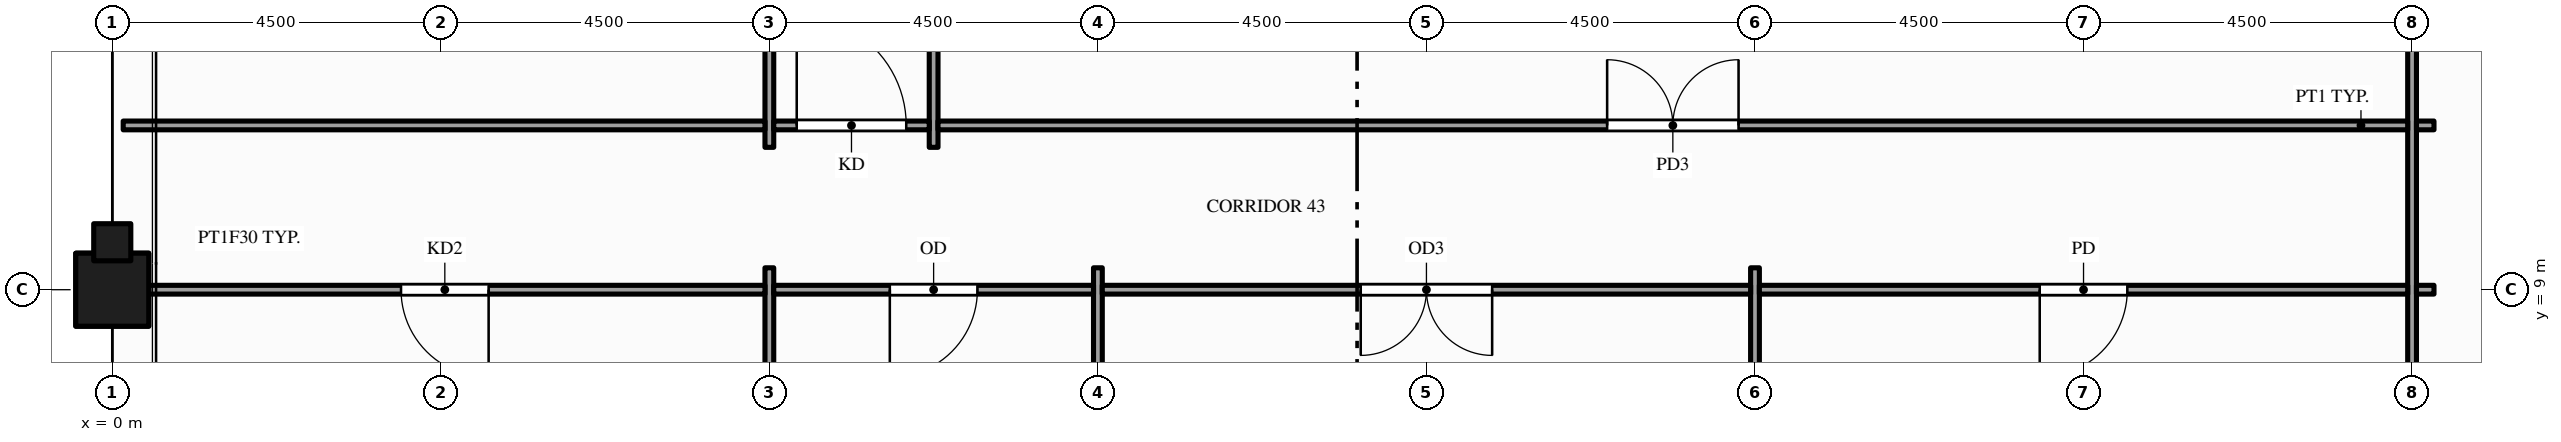
"""IFC4 building model, lengths in metres.
Left out: names, types, materials, properties, quantities, classifications, styles, units other than length and angle.
Written with IfcOpenShell. Run it as: python <this file> out.ifc"""

import sys

from ifc_helpers import new_model, si_unit, direction, frame, frame_2d, origin, origin_2d, place, context, subcontext, project, spatial, rectangle, hollow_rectangle, extrude, element, fill, save


model = new_model("IFC4")
c1 = context("Model", 3, precision=1e-05, world=origin(), true_north=direction((0.0, 1.0)))
c2 = subcontext(c1, "Body", "Model", "MODEL_VIEW")
j1 = project(units=[si_unit("LENGTHUNIT", "METRE"), si_unit("PLANEANGLEUNIT", "RADIAN")], contexts=[c1])
p1 = place(None, origin())
s1 = spatial("IfcSite", under=j1, at=p1, CompositionType="ELEMENT")
p2 = place(p1, origin())
s2 = spatial("IfcBuilding", under=s1, at=p2, CompositionType="ELEMENT")
p3 = place(p2, frame((0.0, 0.0, 131.0)))
s3 = spatial("IfcBuildingStorey", under=s2, at=p3, CompositionType="ELEMENT", Elevation=131.0)
p4 = place(p3, frame((0.0, 9.0, -0.25), z_axis=(0.0, 0.0, 1.0), x_axis=(1.0, 0.0, 0.0)))
e1 = element("IfcColumn", 1, at=p4, inside=s3, PredefinedType="COLUMN", context=c2, shape_type="SweptSolid", body=[
    extrude(hollow_rectangle(XDim=1.0, YDim=1.0, WallThickness=0.05, at=origin_2d()), origin(), (0.0, 0.0, 1.0), 6.6),
])
p5 = place(p3, frame((0.0, 9.0, 6.35), z_axis=(0.0, 0.0, 1.0), x_axis=(1.0, 0.0, 0.0)))
e2 = element("IfcColumn", 2, at=p5, inside=s3, PredefinedType="COLUMN", context=c2, shape_type="SweptSolid", body=[
    extrude(rectangle(XDim=1.0, YDim=1.0, at=origin_2d()), origin(), (0.0, 0.0, 1.0), 1.5),
])
p6 = place(p3, frame((9.0, 3.875, 0.0), z_axis=(0.0, 0.0, 1.0), x_axis=(0.0, 1.0, 0.0)))
e3 = element("IfcWall", 3, at=p6, inside=s3, PredefinedType="PARTITIONING", context=c2, shape_type="SweptSolid", body=[
    extrude(rectangle(XDim=5.425, YDim=0.12, at=frame_2d((2.712, 0.0))), origin(), (0.0, 0.0, 1.0), 6.87),
])
p7 = place(p3, frame((9.0, 10.95, 0.0), z_axis=(0.0, 0.0, 1.0), x_axis=(0.0, 1.0, 0.0)))
e4 = element("IfcWall", 4, at=p7, inside=s3, PredefinedType="PARTITIONING", context=c2, shape_type="SweptSolid", body=[
    extrude(rectangle(XDim=20.85, YDim=0.12, at=frame_2d((10.425, 0.0))), origin(), (0.0, 0.0, 1.0), 6.6),
])
p8 = place(p7, frame((2.05, 0.0, 0.0)))
e5 = element("IfcOpeningElement", 5, at=p8, cuts=e4, PredefinedType="OPENING", context=c2, shape_type="SweptSolid", body=[
    extrude(rectangle(XDim=1.0, YDim=2.1, at=frame_2d((0.5, 1.05))), frame((0.0, 0.07, 0.0), z_axis=(0.0, -1.0, 0.0), x_axis=(1.0, 0.0, 0.0)), (0.0, 0.0, 1.0), 0.14),
])
p9 = place(p7, frame((6.55, 0.0, 0.0)))
e6 = element("IfcOpeningElement", 6, at=p9, cuts=e4, PredefinedType="OPENING", context=c2, shape_type="SweptSolid", body=[
    extrude(rectangle(XDim=1.0, YDim=2.1, at=frame_2d((0.5, 1.05))), frame((0.0, 0.07, 0.0), z_axis=(0.0, -1.0, 0.0), x_axis=(1.0, 0.0, 0.0)), (0.0, 0.0, 1.0), 0.14),
])
p10 = place(p7, frame((12.105, 0.0, 0.0)))
e7 = element("IfcOpeningElement", 7, at=p10, cuts=e4, PredefinedType="OPENING", context=c2, shape_type="SweptSolid", body=[
    extrude(rectangle(XDim=1.2, YDim=2.1, at=frame_2d((0.6, 1.05))), frame((0.0, 0.07, 0.0), z_axis=(0.0, -1.0, 0.0), x_axis=(1.0, 0.0, 0.0)), (0.0, 0.0, 1.0), 0.14),
])
p11 = place(p3, frame((11.25, 10.95, 0.0), z_axis=(0.0, 0.0, 1.0), x_axis=(0.0, 1.0, 0.0)))
e8 = element("IfcWall", 8, at=p11, inside=s3, PredefinedType="PARTITIONING", context=c2, shape_type="SweptSolid", body=[
    extrude(rectangle(XDim=20.85, YDim=0.12, at=frame_2d((10.425, 0.0))), origin(), (0.0, 0.0, 1.0), 6.6),
])
p12 = place(p11, frame((17.8, 0.0, 0.0)))
e9 = element("IfcOpeningElement", 9, at=p12, cuts=e8, PredefinedType="OPENING", context=c2, shape_type="SweptSolid", body=[
    extrude(rectangle(XDim=1.0, YDim=2.1, at=frame_2d((0.5, 1.05))), frame((0.0, 0.07, 0.0), z_axis=(0.0, -1.0, 0.0), x_axis=(1.0, 0.0, 0.0)), (0.0, 0.0, 1.0), 0.14),
])
p13 = place(p11, frame((4.2, 0.0, 0.0)))
e10 = element("IfcOpeningElement", 10, at=p13, cuts=e8, PredefinedType="OPENING", context=c2, shape_type="SweptSolid", body=[
    extrude(rectangle(XDim=1.2, YDim=2.1, at=frame_2d((0.6, 1.05))), frame((0.0, 0.07, 0.0), z_axis=(0.0, -1.0, 0.0), x_axis=(1.0, 0.0, 0.0)), (0.0, 0.0, 1.0), 0.14),
])
p14 = place(p3, frame((13.5, 0.15, 0.0), z_axis=(0.0, 0.0, 1.0), x_axis=(0.0, 1.0, 0.0)))
e11 = element("IfcWall", 11, at=p14, inside=s3, PredefinedType="PARTITIONING", context=c2, shape_type="SweptSolid", body=[
    extrude(rectangle(XDim=9.15, YDim=0.12, at=frame_2d((4.575, 0.0))), origin(), (0.0, 0.0, 1.0), 6.87),
])
p15 = place(p3, frame((22.5, 0.15, 0.0), z_axis=(0.0, 0.0, 1.0), x_axis=(0.0, 1.0, 0.0)))
e12 = element("IfcWall", 12, at=p15, inside=s3, PredefinedType="PARTITIONING", context=c2, shape_type="SweptSolid", body=[
    extrude(rectangle(XDim=9.15, YDim=0.12, at=frame_2d((4.575, 0.0))), origin(), (0.0, 0.0, 1.0), 6.45),
])
p16 = place(p3, frame((31.5, 0.15, 0.0), z_axis=(0.0, 0.0, 1.0), x_axis=(0.0, 1.0, 0.0)))
e13 = element("IfcWall", 13, at=p16, inside=s3, PredefinedType="PARTITIONING", context=c2, shape_type="SweptSolid", body=[
    extrude(rectangle(XDim=22.2, YDim=0.12, at=frame_2d((11.1, 0.0))), origin(), (0.0, 0.0, 1.0), 6.45),
])
p17 = place(p3, frame((0.15, 9.0, 0.0), z_axis=(0.0, 0.0, 1.0), x_axis=(1.0, 0.0, 0.0)))
e14 = element("IfcWall", 14, at=p17, inside=s3, PredefinedType="PARTITIONING", context=c2, shape_type="SweptSolid", body=[
    extrude(rectangle(XDim=8.79, YDim=0.12, at=frame_2d((4.395, 0.0))), origin(), (0.0, 0.0, 1.0), 6.87),
])
p18 = place(p17, frame((3.805, 0.0, 0.0)))
e15 = element("IfcOpeningElement", 15, at=p18, cuts=e14, PredefinedType="OPENING", context=c2, shape_type="SweptSolid", body=[
    extrude(rectangle(XDim=1.2, YDim=2.1, at=frame_2d((0.6, 1.05))), frame((0.0, 0.07, 0.0), z_axis=(0.0, -1.0, 0.0), x_axis=(1.0, 0.0, 0.0)), (0.0, 0.0, 1.0), 0.14),
])
p19 = place(p3, frame((9.06, 9.0, 0.0), z_axis=(0.0, 0.0, 1.0), x_axis=(1.0, 0.0, 0.0)))
e16 = element("IfcWall", 16, at=p19, inside=s3, PredefinedType="PARTITIONING", context=c2, shape_type="SweptSolid", body=[
    extrude(rectangle(XDim=4.38, YDim=0.12, at=frame_2d((2.19, 0.0))), origin(), (0.0, 0.0, 1.0), 6.87),
])
p20 = place(p19, frame((1.59, 0.0, 0.0)))
e17 = element("IfcOpeningElement", 17, at=p20, cuts=e16, PredefinedType="OPENING", context=c2, shape_type="SweptSolid", body=[
    extrude(rectangle(XDim=1.2, YDim=2.1, at=frame_2d((0.6, 1.05))), frame((0.0, 0.07, 0.0), z_axis=(0.0, -1.0, 0.0), x_axis=(1.0, 0.0, 0.0)), (0.0, 0.0, 1.0), 0.14),
])
p21 = place(p3, frame((13.56, 9.0, 0.0), z_axis=(0.0, 0.0, 1.0), x_axis=(1.0, 0.0, 0.0)))
e18 = element("IfcWall", 18, at=p21, inside=s3, PredefinedType="PARTITIONING", context=c2, shape_type="SweptSolid", body=[
    extrude(rectangle(XDim=8.88, YDim=0.12, at=frame_2d((4.44, 0.0))), origin(), (0.0, 0.0, 1.0), 6.87),
])
p22 = place(p21, frame((3.54, 0.0, 0.0)))
e19 = element("IfcOpeningElement", 19, at=p22, cuts=e18, PredefinedType="OPENING", context=c2, shape_type="SweptSolid", body=[
    extrude(rectangle(XDim=1.8, YDim=2.1, at=frame_2d((0.9, 1.05))), frame((0.0, 0.07, 0.0), z_axis=(0.0, -1.0, 0.0), x_axis=(1.0, 0.0, 0.0)), (0.0, 0.0, 1.0), 0.14),
])
p23 = place(p3, frame((22.56, 9.0, 0.0), z_axis=(0.0, 0.0, 1.0), x_axis=(1.0, 0.0, 0.0)))
e20 = element("IfcWall", 20, at=p23, inside=s3, PredefinedType="PARTITIONING", context=c2, shape_type="SweptSolid", body=[
    extrude(rectangle(XDim=8.88, YDim=0.12, at=frame_2d((4.44, 0.0))), origin(), (0.0, 0.0, 1.0), 6.87),
])
p24 = place(p23, frame((3.84, 0.0, 0.0)))
e21 = element("IfcOpeningElement", 21, at=p24, cuts=e20, PredefinedType="OPENING", context=c2, shape_type="SweptSolid", body=[
    extrude(rectangle(XDim=1.2, YDim=2.1, at=frame_2d((0.6, 1.05))), frame((0.0, 0.07, 0.0), z_axis=(0.0, -1.0, 0.0), x_axis=(1.0, 0.0, 0.0)), (0.0, 0.0, 1.0), 0.14),
])
p25 = place(p3, frame((31.56, 9.0, 0.0), z_axis=(0.0, 0.0, 1.0), x_axis=(1.0, 0.0, 0.0)))
e22 = element("IfcWall", 22, at=p25, inside=s3, PredefinedType="PARTITIONING", context=c2, shape_type="SweptSolid", body=[
    extrude(rectangle(XDim=0.24, YDim=0.12, at=frame_2d((0.12, 0.0))), origin(), (0.0, 0.0, 1.0), 7.149),
])
p26 = place(p3, frame((0.15, 11.25, 0.0), z_axis=(0.0, 0.0, 1.0), x_axis=(1.0, 0.0, 0.0)))
e23 = element("IfcWall", 23, at=p26, inside=s3, PredefinedType="PARTITIONING", context=c2, shape_type="SweptSolid", body=[
    extrude(rectangle(XDim=8.79, YDim=0.12, at=frame_2d((4.395, 0.0))), origin(), (0.0, 0.0, 1.0), 6.87),
])
p27 = place(p3, frame((9.06, 11.25, 0.0), z_axis=(0.0, 0.0, 1.0), x_axis=(1.0, 0.0, 0.0)))
e24 = element("IfcWall", 24, at=p27, inside=s3, PredefinedType="PARTITIONING", context=c2, shape_type="SweptSolid", body=[
    extrude(rectangle(XDim=2.13, YDim=0.12, at=frame_2d((1.065, 0.0))), origin(), (0.0, 0.0, 1.0), 6.87),
])
p28 = place(p27, frame((0.315, 0.0, 0.0)))
e25 = element("IfcOpeningElement", 25, at=p28, cuts=e24, PredefinedType="OPENING", context=c2, shape_type="SweptSolid", body=[
    extrude(rectangle(XDim=1.5, YDim=2.1, at=frame_2d((0.75, 1.05))), frame((0.0, 0.07, 0.0), z_axis=(0.0, -1.0, 0.0), x_axis=(1.0, 0.0, 0.0)), (0.0, 0.0, 1.0), 0.14),
])
p29 = place(p3, frame((11.31, 11.25, 0.0), z_axis=(0.0, 0.0, 1.0), x_axis=(1.0, 0.0, 0.0)))
e26 = element("IfcWall", 26, at=p29, inside=s3, PredefinedType="PARTITIONING", context=c2, shape_type="SweptSolid", body=[
    extrude(rectangle(XDim=20.13, YDim=0.12, at=frame_2d((10.065, 0.0))), origin(), (0.0, 0.0, 1.0), 6.87),
])
p30 = place(p29, frame((9.165, 0.0, 0.0)))
e27 = element("IfcOpeningElement", 27, at=p30, cuts=e26, PredefinedType="OPENING", context=c2, shape_type="SweptSolid", body=[
    extrude(rectangle(XDim=1.8, YDim=2.1, at=frame_2d((0.9, 1.05))), frame((0.0, 0.07, 0.0), z_axis=(0.0, -1.0, 0.0), x_axis=(1.0, 0.0, 0.0)), (0.0, 0.0, 1.0), 0.14),
])
p31 = place(p3, frame((31.56, 11.25, 0.0), z_axis=(0.0, 0.0, 1.0), x_axis=(1.0, 0.0, 0.0)))
e28 = element("IfcWall", 28, at=p31, inside=s3, PredefinedType="PARTITIONING", context=c2, shape_type="SweptSolid", body=[
    extrude(rectangle(XDim=0.24, YDim=0.12, at=frame_2d((0.12, 0.0))), origin(), (0.0, 0.0, 1.0), 7.149),
])
p32 = place(p18, origin())
e29 = element("IfcDoor", 29, at=p32, inside=s3, OperationType="SINGLE_SWING_RIGHT", PredefinedType="DOOR", context=c2, shape_type="SweptSolid", body=[
    extrude(rectangle(XDim=1.2, YDim=2.1, at=frame_2d((0.6, 1.05))), frame((0.0, 0.025, 0.0), z_axis=(0.0, -1.0, 0.0), x_axis=(1.0, 0.0, 0.0)), (0.0, 0.0, 1.0), 0.05),
])
fill(e15, e29)
p33 = place(p20, origin())
e30 = element("IfcDoor", 30, at=p33, inside=s3, OperationType="SINGLE_SWING_LEFT", PredefinedType="DOOR", context=c2, shape_type="SweptSolid", body=[
    extrude(rectangle(XDim=1.2, YDim=2.1, at=frame_2d((0.6, 1.05))), frame((0.0, 0.025, 0.0), z_axis=(0.0, -1.0, 0.0), x_axis=(1.0, 0.0, 0.0)), (0.0, 0.0, 1.0), 0.05),
])
fill(e17, e30)
p34 = place(p22, origin())
e31 = element("IfcDoor", 31, at=p34, inside=s3, OperationType="DOUBLE_DOOR_SINGLE_SWING", PredefinedType="DOOR", context=c2, shape_type="SweptSolid", body=[
    extrude(rectangle(XDim=1.8, YDim=2.1, at=frame_2d((0.9, 1.05))), frame((0.0, 0.025, 0.0), z_axis=(0.0, -1.0, 0.0), x_axis=(1.0, 0.0, 0.0)), (0.0, 0.0, 1.0), 0.05),
])
fill(e19, e31)
p35 = place(p24, origin())
e32 = element("IfcDoor", 32, at=p35, inside=s3, OperationType="SINGLE_SWING_LEFT", PredefinedType="DOOR", context=c2, shape_type="SweptSolid", body=[
    extrude(rectangle(XDim=1.2, YDim=2.1, at=frame_2d((0.6, 1.05))), frame((0.0, 0.025, 0.0), z_axis=(0.0, -1.0, 0.0), x_axis=(1.0, 0.0, 0.0)), (0.0, 0.0, 1.0), 0.05),
])
fill(e21, e32)
p36 = place(p30, origin())
e33 = element("IfcDoor", 33, at=p36, inside=s3, OperationType="DOUBLE_DOOR_SINGLE_SWING", PredefinedType="DOOR", context=c2, shape_type="SweptSolid", body=[
    extrude(rectangle(XDim=1.8, YDim=2.1, at=frame_2d((0.9, 1.05))), frame((0.0, 0.025, 0.0), z_axis=(0.0, -1.0, 0.0), x_axis=(1.0, 0.0, 0.0)), (0.0, 0.0, 1.0), 0.05),
])
fill(e27, e33)
p37 = place(p28, origin())
e34 = element("IfcDoor", 34, at=p37, inside=s3, OperationType="SINGLE_SWING_LEFT", PredefinedType="DOOR", context=c2, shape_type="SweptSolid", body=[
    extrude(rectangle(XDim=1.5, YDim=2.1, at=frame_2d((0.75, 1.05))), frame((0.0, 0.025, 0.0), z_axis=(0.0, -1.0, 0.0), x_axis=(1.0, 0.0, 0.0)), (0.0, 0.0, 1.0), 0.05),
])
fill(e25, e34)
save(model, sys.argv[1])
